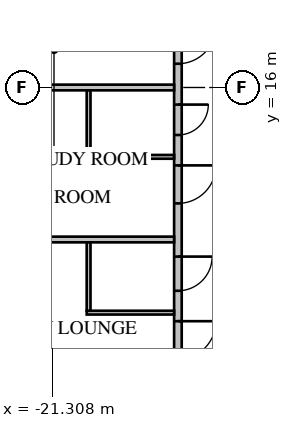
"""IFC4 building model, lengths in metres.
Left out: names, types, materials, properties, quantities, classifications, styles, units other than length and angle.
Written with IfcOpenShell. Run it as: python <this file> out.ifc"""

import sys

from ifc_helpers import new_model, si_unit, direction, frame, frame_2d, origin, place, context, subcontext, project, spatial, rectangle, extrude, element, fill, save


model = new_model("IFC4")
c1 = context("Model", 3, precision=1e-05, world=origin(), true_north=direction((0.0, 1.0)))
c2 = subcontext(c1, "Body", "Model", "MODEL_VIEW")
j1 = project(units=[si_unit("LENGTHUNIT", "METRE"), si_unit("PLANEANGLEUNIT", "RADIAN")], contexts=[c1])
p1 = place(None, origin())
s1 = spatial("IfcSite", under=j1, at=p1, CompositionType="ELEMENT")
p2 = place(p1, origin())
s2 = spatial("IfcBuilding", under=s1, at=p2, CompositionType="ELEMENT")
p3 = place(p2, frame((0.0, 0.0, 16.0)))
s3 = spatial("IfcBuildingStorey", under=s2, at=p3, CompositionType="ELEMENT", Elevation=16.0)
p4 = place(p3, frame((-18.0, 18.0, 0.0), z_axis=(0.0, 0.0, 1.0), x_axis=(0.0, -1.0, 0.0)))
e1 = element("IfcWall", 1, at=p4, inside=s3, PredefinedType="PARTITIONING", context=c2, shape_type="SweptSolid", body=[
    extrude(rectangle(XDim=36.0, YDim=0.2, at=frame_2d((18.0, 0.0))), origin(), (0.0, 0.0, 1.0), 3.65),
])
p5 = place(p4, frame((0.375, 0.0, 0.0)))
e2 = element("IfcOpeningElement", 2, at=p5, cuts=e1, PredefinedType="OPENING", context=c2, shape_type="SweptSolid", body=[
    extrude(rectangle(XDim=1.0, YDim=2.1, at=frame_2d((0.5, 1.05))), frame((0.0, 0.12, 0.0), z_axis=(0.0, -1.0, 0.0), x_axis=(1.0, 0.0, 0.0)), (0.0, 0.0, 1.0), 0.24),
])
p6 = place(p4, frame((2.45, 0.0, 0.0)))
e3 = element("IfcOpeningElement", 3, at=p6, cuts=e1, PredefinedType="OPENING", context=c2, shape_type="SweptSolid", body=[
    extrude(rectangle(XDim=0.8, YDim=2.1, at=frame_2d((0.4, 1.05))), frame((0.0, 0.12, 0.0), z_axis=(0.0, -1.0, 0.0), x_axis=(1.0, 0.0, 0.0)), (0.0, 0.0, 1.0), 0.24),
])
p7 = place(p4, frame((4.05, 0.0, 0.0)))
e4 = element("IfcOpeningElement", 4, at=p7, cuts=e1, PredefinedType="OPENING", context=c2, shape_type="SweptSolid", body=[
    extrude(rectangle(XDim=1.0, YDim=2.1, at=frame_2d((0.5, 1.05))), frame((0.0, 0.12, 0.0), z_axis=(0.0, -1.0, 0.0), x_axis=(1.0, 0.0, 0.0)), (0.0, 0.0, 1.0), 0.24),
])
p8 = place(p4, frame((6.45, 0.0, 0.0)))
e5 = element("IfcOpeningElement", 5, at=p8, cuts=e1, PredefinedType="OPENING", context=c2, shape_type="SweptSolid", body=[
    extrude(rectangle(XDim=0.9, YDim=2.1, at=frame_2d((0.45, 1.05))), frame((0.0, 0.12, 0.0), z_axis=(0.0, -1.0, 0.0), x_axis=(1.0, 0.0, 0.0)), (0.0, 0.0, 1.0), 0.24),
])
p9 = place(p4, frame((8.15, 0.0, 0.0)))
e6 = element("IfcOpeningElement", 6, at=p9, cuts=e1, PredefinedType="OPENING", context=c2, shape_type="SweptSolid", body=[
    extrude(rectangle(XDim=1.0, YDim=2.1, at=frame_2d((0.5, 1.05))), frame((0.0, 0.12, 0.0), z_axis=(0.0, -1.0, 0.0), x_axis=(1.0, 0.0, 0.0)), (0.0, 0.0, 1.0), 0.24),
])
p10 = place(p4, frame((20.05, 0.0, 0.0)))
e7 = element("IfcOpeningElement", 7, at=p10, cuts=e1, PredefinedType="OPENING", context=c2, shape_type="SweptSolid", body=[
    extrude(rectangle(XDim=0.95, YDim=2.1, at=frame_2d((0.475, 1.05))), frame((0.0, 0.12, 0.0), z_axis=(0.0, -1.0, 0.0), x_axis=(1.0, 0.0, 0.0)), (0.0, 0.0, 1.0), 0.24),
])
p11 = place(p4, frame((24.05, 0.0, 0.0)))
e8 = element("IfcOpeningElement", 8, at=p11, cuts=e1, PredefinedType="OPENING", context=c2, shape_type="SweptSolid", body=[
    extrude(rectangle(XDim=0.95, YDim=2.1, at=frame_2d((0.475, 1.05))), frame((0.0, 0.12, 0.0), z_axis=(0.0, -1.0, 0.0), x_axis=(1.0, 0.0, 0.0)), (0.0, 0.0, 1.0), 0.24),
])
p12 = place(p4, frame((28.05, 0.0, 0.0)))
e9 = element("IfcOpeningElement", 9, at=p12, cuts=e1, PredefinedType="OPENING", context=c2, shape_type="SweptSolid", body=[
    extrude(rectangle(XDim=0.95, YDim=2.1, at=frame_2d((0.475, 1.05))), frame((0.0, 0.12, 0.0), z_axis=(0.0, -1.0, 0.0), x_axis=(1.0, 0.0, 0.0)), (0.0, 0.0, 1.0), 0.24),
])
p13 = place(p4, frame((32.05, 0.0, 0.0)))
e10 = element("IfcOpeningElement", 10, at=p13, cuts=e1, PredefinedType="OPENING", context=c2, shape_type="SweptSolid", body=[
    extrude(rectangle(XDim=0.95, YDim=2.1, at=frame_2d((0.475, 1.05))), frame((0.0, 0.12, 0.0), z_axis=(0.0, -1.0, 0.0), x_axis=(1.0, 0.0, 0.0)), (0.0, 0.0, 1.0), 0.24),
])
p14 = place(p4, frame((34.375, 0.0, 0.0)))
e11 = element("IfcOpeningElement", 11, at=p14, cuts=e1, PredefinedType="OPENING", context=c2, shape_type="SweptSolid", body=[
    extrude(rectangle(XDim=0.95, YDim=2.1, at=frame_2d((0.475, 1.05))), frame((0.0, 0.12, 0.0), z_axis=(0.0, -1.0, 0.0), x_axis=(1.0, 0.0, 0.0)), (0.0, 0.0, 1.0), 0.24),
])
p15 = place(p4, frame((11.2, 0.0, 0.0)))
e12 = element("IfcOpeningElement", 12, at=p15, cuts=e1, PredefinedType="OPENING", context=c2, shape_type="SweptSolid", body=[
    extrude(rectangle(XDim=1.0, YDim=2.1, at=frame_2d((0.5, 1.05))), frame((0.0, 0.12, 0.0), z_axis=(0.0, -1.0, 0.0), x_axis=(1.0, 0.0, 0.0)), (0.0, 0.0, 1.0), 0.24),
])
p16 = place(p3, frame((-18.1, 16.0, 0.0), z_axis=(0.0, 0.0, 1.0), x_axis=(-1.0, 0.0, 0.0)))
e13 = element("IfcWall", 13, at=p16, inside=s3, PredefinedType="PARTITIONING", context=c2, shape_type="SweptSolid", body=[
    extrude(rectangle(XDim=6.589, YDim=0.15, at=frame_2d((3.295, 0.0))), origin(), (0.0, 0.0, 1.0), 3.65),
])
p17 = place(p3, frame((-18.1, 12.0, 0.0), z_axis=(0.0, 0.0, 1.0), x_axis=(-1.0, 0.0, 0.0)))
e14 = element("IfcWall", 14, at=p17, inside=s3, PredefinedType="PARTITIONING", context=c2, shape_type="SweptSolid", body=[
    extrude(rectangle(XDim=6.6, YDim=0.15, at=frame_2d((3.3, 0.0))), origin(), (0.0, 0.0, 1.0), 3.65),
])
p18 = place(p3, frame((-18.1, 14.175, 0.0), z_axis=(0.0, 0.0, 1.0), x_axis=(-1.0, 0.0, 0.0)))
e15 = element("IfcWall", 15, at=p18, inside=s3, PredefinedType="PARTITIONING", context=c2, shape_type="SweptSolid", body=[
    extrude(rectangle(XDim=2.3, YDim=0.1, at=frame_2d((1.15, 0.0))), origin(), (0.0, 0.0, 1.0), 3.65),
])
p19 = place(p3, frame((-20.35, 15.925, 0.0), z_axis=(0.0, 0.0, 1.0), x_axis=(0.0, -1.0, 0.0)))
e16 = element("IfcWall", 16, at=p19, inside=s3, PredefinedType="PARTITIONING", context=c2, shape_type="SweptSolid", body=[
    extrude(rectangle(XDim=1.7, YDim=0.1, at=frame_2d((0.85, 0.0))), origin(), (0.0, 0.0, 1.0), 3.65),
])
p20 = place(p3, frame((-18.1, 10.075, 0.0), z_axis=(0.0, 0.0, 1.0), x_axis=(-1.0, 0.0, 0.0)))
e17 = element("IfcWall", 17, at=p20, inside=s3, PredefinedType="PARTITIONING", context=c2, shape_type="SweptSolid", body=[
    extrude(rectangle(XDim=2.3, YDim=0.1, at=frame_2d((1.15, 0.0))), origin(), (0.0, 0.0, 1.0), 3.65),
])
p21 = place(p3, frame((-20.35, 11.925, 0.0), z_axis=(0.0, 0.0, 1.0), x_axis=(0.0, -1.0, 0.0)))
e18 = element("IfcWall", 18, at=p21, inside=s3, PredefinedType="PARTITIONING", context=c2, shape_type="SweptSolid", body=[
    extrude(rectangle(XDim=1.8, YDim=0.1, at=frame_2d((0.9, 0.0))), origin(), (0.0, 0.0, 1.0), 3.65),
])
p22 = place(p5, origin())
e19 = element("IfcDoor", 19, at=p22, inside=s3, OperationType="SINGLE_SWING_LEFT", PredefinedType="DOOR", context=c2, shape_type="SweptSolid", body=[
    extrude(rectangle(XDim=1.0, YDim=2.1, at=frame_2d((0.5, 1.05))), frame((0.0, 0.025, 0.0), z_axis=(0.0, -1.0, 0.0), x_axis=(1.0, 0.0, 0.0)), (0.0, 0.0, 1.0), 0.05),
])
fill(e2, e19)
p23 = place(p6, origin())
e20 = element("IfcDoor", 20, at=p23, inside=s3, OperationType="SINGLE_SWING_LEFT", PredefinedType="DOOR", context=c2, shape_type="SweptSolid", body=[
    extrude(rectangle(XDim=0.8, YDim=2.1, at=frame_2d((0.4, 1.05))), frame((0.0, 0.025, 0.0), z_axis=(0.0, -1.0, 0.0), x_axis=(1.0, 0.0, 0.0)), (0.0, 0.0, 1.0), 0.05),
])
fill(e3, e20)
p24 = place(p7, origin())
e21 = element("IfcDoor", 21, at=p24, inside=s3, OperationType="SINGLE_SWING_LEFT", PredefinedType="DOOR", context=c2, shape_type="SweptSolid", body=[
    extrude(rectangle(XDim=1.0, YDim=2.1, at=frame_2d((0.5, 1.05))), frame((0.0, 0.025, 0.0), z_axis=(0.0, -1.0, 0.0), x_axis=(1.0, 0.0, 0.0)), (0.0, 0.0, 1.0), 0.05),
])
fill(e4, e21)
p25 = place(p8, origin())
e22 = element("IfcDoor", 22, at=p25, inside=s3, OperationType="SINGLE_SWING_LEFT", PredefinedType="DOOR", context=c2, shape_type="SweptSolid", body=[
    extrude(rectangle(XDim=0.9, YDim=2.1, at=frame_2d((0.45, 1.05))), frame((0.0, 0.025, 0.0), z_axis=(0.0, -1.0, 0.0), x_axis=(1.0, 0.0, 0.0)), (0.0, 0.0, 1.0), 0.05),
])
fill(e5, e22)
p26 = place(p9, origin())
e23 = element("IfcDoor", 23, at=p26, inside=s3, OperationType="SINGLE_SWING_LEFT", PredefinedType="DOOR", context=c2, shape_type="SweptSolid", body=[
    extrude(rectangle(XDim=1.0, YDim=2.1, at=frame_2d((0.5, 1.05))), frame((0.0, 0.025, 0.0), z_axis=(0.0, -1.0, 0.0), x_axis=(1.0, 0.0, 0.0)), (0.0, 0.0, 1.0), 0.05),
])
fill(e6, e23)
save(model, sys.argv[1])
